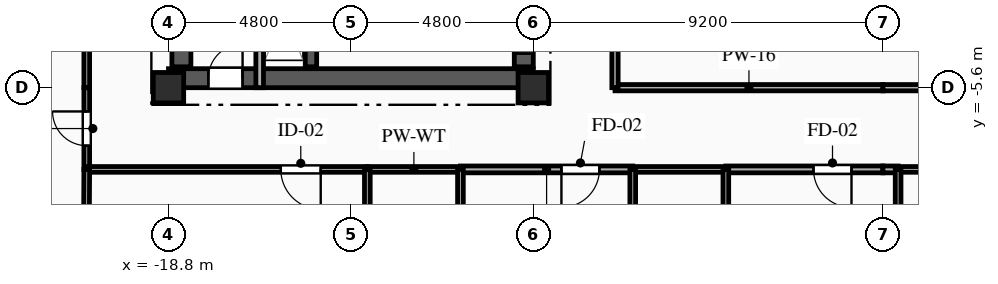
"""IFC4 building model, lengths in metres.
Left out: names, types, materials, properties, quantities, classifications, styles, units other than length and angle.
Written with IfcOpenShell. Run it as: python <this file> out.ifc"""

import sys

from ifc_helpers import new_model, si_unit, direction, frame, frame_2d, origin, origin_2d, place, context, subcontext, project, spatial, rectangle, extrude, element, fill, save


model = new_model("IFC4")
c1 = context("Model", 3, precision=1e-05, world=origin(), true_north=direction((0.0, 1.0)))
c2 = subcontext(c1, "Body", "Model", "MODEL_VIEW")
j1 = project(units=[si_unit("LENGTHUNIT", "METRE"), si_unit("PLANEANGLEUNIT", "RADIAN")], contexts=[c1])
p1 = place(None, origin())
s1 = spatial("IfcSite", under=j1, at=p1, CompositionType="ELEMENT")
p2 = place(p1, origin())
s2 = spatial("IfcBuilding", under=s1, at=p2, CompositionType="ELEMENT")
p3 = place(p2, frame((0.0, 0.0, 213.15)))
s3 = spatial("IfcBuildingStorey", under=s2, at=p3, CompositionType="ELEMENT", Elevation=213.15)
for number, where, z_axis, x_axis in (
    (1, (-18.8, -5.6, 0.0), (0.0, 0.0, 1.0), (1.0, 0.0, 0.0)),
    (2, (-9.2, -5.6, 0.0), (0.0, 0.0, 1.0), (1.0, 0.0, 0.0)),
):
    element("IfcColumn", number, at=place(p3, frame(where, z_axis=z_axis, x_axis=x_axis)), inside=s3, PredefinedType="COLUMN", context=c2, shape_type="SweptSolid", body=[
        extrude(rectangle(XDim=0.8, YDim=0.8, at=origin_2d()), origin(), (0.0, 0.0, 1.0), 3.35),
    ])
p4 = place(p3, frame((-18.8, -5.35, 0.0), z_axis=(0.0, 0.0, 1.0), x_axis=(1.0, 0.0, 0.0)))
e3 = element("IfcWall", 3, at=p4, inside=s3, PredefinedType="SHEAR", context=c2, shape_type="SweptSolid", body=[
    extrude(rectangle(XDim=9.6, YDim=0.5, at=frame_2d((4.8, 0.0))), origin(), (0.0, 0.0, 1.0), 3.04),
])
p5 = place(p4, frame((1.05, 0.0, 0.0)))
e4 = element("IfcOpeningElement", 4, at=p5, cuts=e3, PredefinedType="OPENING", context=c2, shape_type="SweptSolid", body=[
    extrude(rectangle(XDim=0.9, YDim=2.1, at=frame_2d((0.45, 1.05))), frame((0.0, 0.26, 0.0), z_axis=(0.0, -1.0, 0.0), x_axis=(1.0, 0.0, 0.0)), (0.0, 0.0, 1.0), 0.52),
])
p6 = place(p3, frame((-18.46, -5.05, 0.0), z_axis=(0.0, 0.0, 1.0), x_axis=(0.0, 1.0, 0.0)))
e5 = element("IfcWall", 5, at=p6, inside=s3, PredefinedType="SHEAR", context=c2, shape_type="SweptSolid", body=[
    extrude(rectangle(XDim=10.1, YDim=0.5, at=frame_2d((5.05, 0.0))), origin(), (0.0, 0.0, 1.0), 3.04),
])
p7 = place(p3, frame((-9.45, -5.05, 0.0), z_axis=(0.0, 0.0, 1.0), x_axis=(0.0, 1.0, 0.0)))
e6 = element("IfcWall", 6, at=p7, inside=s3, PredefinedType="SHEAR", context=c2, shape_type="SweptSolid", body=[
    extrude(rectangle(XDim=10.1, YDim=0.5, at=frame_2d((5.05, 0.0))), origin(), (0.0, 0.0, 1.0), 3.04),
])
p8 = place(p7, frame((7.15, 0.0, 0.0)))
e7 = element("IfcOpeningElement", 7, at=p8, cuts=e6, PredefinedType="OPENING", context=c2, shape_type="SweptSolid", body=[
    extrude(rectangle(XDim=0.9, YDim=2.1, at=frame_2d((0.45, 1.05))), frame((0.0, 0.26, 0.0), z_axis=(0.0, -1.0, 0.0), x_axis=(1.0, 0.0, 0.0)), (0.0, 0.0, 1.0), 0.52),
])
p9 = place(p7, frame((2.4, 0.0, 0.0)))
e8 = element("IfcOpeningElement", 8, at=p9, cuts=e6, PredefinedType="OPENING", context=c2, shape_type="SweptSolid", body=[
    extrude(rectangle(XDim=1.2, YDim=2.15, at=frame_2d((0.6, 1.075))), frame((0.0, 0.26, 0.0), z_axis=(0.0, -1.0, 0.0), x_axis=(1.0, 0.0, 0.0)), (0.0, 0.0, 1.0), 0.52),
])
p10 = place(p7, frame((0.35, 0.0, 0.0)))
e9 = element("IfcOpeningElement", 9, at=p10, cuts=e6, PredefinedType="OPENING", context=c2, shape_type="SweptSolid", body=[
    extrude(rectangle(XDim=0.9, YDim=2.1, at=frame_2d((0.45, 1.05))), frame((0.0, 0.26, 0.0), z_axis=(0.0, -1.0, 0.0), x_axis=(1.0, 0.0, 0.0)), (0.0, 0.0, 1.0), 0.52),
])
p11 = place(p7, frame((5.0, 0.0, 0.0)))
e10 = element("IfcOpeningElement", 10, at=p11, cuts=e6, PredefinedType="OPENING", context=c2, shape_type="SweptSolid", body=[
    extrude(rectangle(XDim=0.9, YDim=2.1, at=frame_2d((0.45, 1.05))), frame((0.0, 0.26, 0.0), z_axis=(0.0, -1.0, 0.0), x_axis=(1.0, 0.0, 0.0)), (0.0, 0.0, 1.0), 0.52),
])
p12 = place(p3, frame((-15.05, -5.05, 0.0), z_axis=(0.0, 0.0, 1.0), x_axis=(0.0, 1.0, 0.0)))
e11 = element("IfcWall", 11, at=p12, inside=s3, PredefinedType="SHEAR", context=c2, shape_type="SweptSolid", body=[
    extrude(rectangle(XDim=10.1, YDim=0.3, at=frame_2d((5.05, 0.0))), origin(), (0.0, 0.0, 1.0), 3.04),
])
p13 = place(p3, frame((-16.4, -5.6, 0.0), z_axis=(0.0, 0.0, 1.0), x_axis=(0.0, 1.0, 0.0)))
e12 = element("IfcWall", 12, at=p13, inside=s3, PredefinedType="PARTITIONING", context=c2, shape_type="SweptSolid", body=[
    extrude(rectangle(XDim=3.49, YDim=0.2, at=frame_2d((1.745, 0.0))), origin(), (0.0, 0.0, 1.0), 3.04),
])
p14 = place(p3, frame((-20.95, -7.75, 0.0), z_axis=(0.0, 0.0, 1.0), x_axis=(0.0, 1.0, 0.0)))
e13 = element("IfcWall", 13, at=p14, inside=s3, PredefinedType="PARTITIONING", context=c2, shape_type="SweptSolid", body=[
    extrude(rectangle(XDim=2.15, YDim=0.15, at=frame_2d((1.075, 0.0))), origin(), (0.0, 0.0, 1.0), 3.04),
])
p15 = place(p14, frame((0.625, 0.0, 0.0)))
e14 = element("IfcOpeningElement", 14, at=p15, cuts=e13, PredefinedType="OPENING", context=c2, shape_type="SweptSolid", body=[
    extrude(rectangle(XDim=0.9, YDim=2.1, at=frame_2d((0.45, 1.05))), frame((0.0, 0.085, 0.0), z_axis=(0.0, -1.0, 0.0), x_axis=(1.0, 0.0, 0.0)), (0.0, 0.0, 1.0), 0.17),
])
p16 = place(p3, frame((-13.567, -7.75, 0.0), z_axis=(0.0, 0.0, 1.0), x_axis=(-1.0, 0.0, 0.0)))
e15 = element("IfcWall", 15, at=p16, inside=s3, PredefinedType="PARTITIONING", context=c2, shape_type="SweptSolid", body=[
    extrude(rectangle(XDim=7.383, YDim=0.15, at=frame_2d((3.691, 0.0))), origin(), (0.0, 0.0, 1.0), 3.04),
])
p17 = place(p16, frame((1.227, 0.0, 0.0)))
e16 = element("IfcOpeningElement", 16, at=p17, cuts=e15, PredefinedType="OPENING", context=c2, shape_type="SweptSolid", body=[
    extrude(rectangle(XDim=1.05, YDim=2.15, at=frame_2d((0.525, 1.075))), frame((0.0, 0.085, 0.0), z_axis=(0.0, -1.0, 0.0), x_axis=(1.0, 0.0, 0.0)), (0.0, 0.0, 1.0), 0.17),
])
p18 = place(p3, frame((-6.583, -7.75, 0.0), z_axis=(0.0, 0.0, 1.0), x_axis=(-1.0, 0.0, 0.0)))
e17 = element("IfcWall", 17, at=p18, inside=s3, PredefinedType="PARTITIONING", context=c2, shape_type="SweptSolid", body=[
    extrude(rectangle(XDim=4.534, YDim=0.18, at=frame_2d((2.267, 0.0))), origin(), (0.0, 0.0, 1.0), 3.04),
])
p19 = place(p18, frame((0.877, 0.0, 0.0)))
e18 = element("IfcOpeningElement", 18, at=p19, cuts=e17, PredefinedType="OPENING", context=c2, shape_type="SweptSolid", body=[
    extrude(rectangle(XDim=1.0, YDim=2.15, at=frame_2d((0.5, 1.075))), frame((0.0, 0.1, 0.0), z_axis=(0.0, -1.0, 0.0), x_axis=(1.0, 0.0, 0.0)), (0.0, 0.0, 1.0), 0.2),
])
p20 = place(p3, frame((-11.117, -7.75, 0.0), z_axis=(0.0, 0.0, 1.0), x_axis=(-1.0, 0.0, 0.0)))
e19 = element("IfcWall", 19, at=p20, inside=s3, PredefinedType="PLUMBINGWALL", context=c2, shape_type="SweptSolid", body=[
    extrude(rectangle(XDim=2.45, YDim=0.15, at=frame_2d((1.225, 0.0))), origin(), (0.0, 0.0, 1.0), 3.04),
])
p21 = place(p3, frame((0.0, -7.75, 0.0), z_axis=(0.0, 0.0, 1.0), x_axis=(-1.0, 0.0, 0.0)))
e20 = element("IfcWall", 20, at=p21, inside=s3, PredefinedType="PARTITIONING", context=c2, shape_type="SweptSolid", body=[
    extrude(rectangle(XDim=4.133, YDim=0.18, at=frame_2d((2.066, 0.0))), origin(), (0.0, 0.0, 1.0), 3.04),
])
p22 = place(p21, frame((0.827, 0.0, 0.0)))
e21 = element("IfcOpeningElement", 21, at=p22, cuts=e20, PredefinedType="OPENING", context=c2, shape_type="SweptSolid", body=[
    extrude(rectangle(XDim=1.0, YDim=2.15, at=frame_2d((0.5, 1.075))), frame((0.0, 0.1, 0.0), z_axis=(0.0, -1.0, 0.0), x_axis=(1.0, 0.0, 0.0)), (0.0, 0.0, 1.0), 0.2),
])
p23 = place(p3, frame((-4.133, -7.75, 0.0), z_axis=(0.0, 0.0, 1.0), x_axis=(-1.0, 0.0, 0.0)))
e22 = element("IfcWall", 22, at=p23, inside=s3, PredefinedType="PLUMBINGWALL", context=c2, shape_type="SweptSolid", body=[
    extrude(rectangle(XDim=2.45, YDim=0.15, at=frame_2d((1.225, 0.0))), origin(), (0.0, 0.0, 1.0), 3.04),
])
p24 = place(p3, frame((-7.05, -5.6, 0.0), z_axis=(0.0, 0.0, 1.0), x_axis=(1.0, 0.0, 0.0)))
e23 = element("IfcWall", 23, at=p24, inside=s3, PredefinedType="PARTITIONING", context=c2, shape_type="SweptSolid", body=[
    extrude(rectangle(XDim=7.05, YDim=0.165, at=frame_2d((3.525, 0.0))), origin(), (0.0, 0.0, 1.0), 2.525),
])
p25 = place(p3, frame((0.4, -7.75, 0.0), z_axis=(0.0, 0.0, 1.0), x_axis=(-1.0, 0.0, 0.0)))
e24 = element("IfcWall", 24, at=p25, inside=s3, PredefinedType="PARTITIONING", context=c2, shape_type="SweptSolid", body=[
    extrude(rectangle(XDim=0.4, YDim=0.18, at=frame_2d((0.2, 0.0))), origin(), (0.0, 0.0, 1.0), 3.04),
])
p26 = place(p3, frame((2.85, -7.75, 0.0), z_axis=(0.0, 0.0, 1.0), x_axis=(-1.0, 0.0, 0.0)))
e25 = element("IfcWall", 25, at=p26, inside=s3, PredefinedType="PLUMBINGWALL", context=c2, shape_type="SweptSolid", body=[
    extrude(rectangle(XDim=2.45, YDim=0.15, at=frame_2d((1.225, 0.0))), origin(), (0.0, 0.0, 1.0), 3.04),
])
p27 = place(p3, frame((0.0, -5.6, 0.0), z_axis=(0.0, 0.0, 1.0), x_axis=(1.0, 0.0, 0.0)))
e26 = element("IfcWall", 26, at=p27, inside=s3, PredefinedType="PARTITIONING", context=c2, shape_type="SweptSolid", body=[
    extrude(rectangle(XDim=7.05, YDim=0.165, at=frame_2d((3.525, 0.0))), origin(), (0.0, 0.0, 1.0), 2.525),
])
p28 = place(p3, frame((-20.95, -5.6, 0.0), z_axis=(0.0, 0.0, 1.0), x_axis=(0.0, 1.0, 0.0)))
e27 = element("IfcWall", 27, at=p28, inside=s3, PredefinedType="PARTITIONING", context=c2, shape_type="SweptSolid", body=[
    extrude(rectangle(XDim=2.144, YDim=0.15, at=frame_2d((1.072, 0.0))), origin(), (0.0, 0.0, 1.0), 3.04),
])
p29 = place(p3, frame((-7.05, -2.95, 0.0), z_axis=(0.0, 0.0, 1.0), x_axis=(0.0, -1.0, 0.0)))
e28 = element("IfcWall", 28, at=p29, inside=s3, PredefinedType="PARTITIONING", context=c2, shape_type="SweptSolid", body=[
    extrude(rectangle(XDim=2.65, YDim=0.165, at=frame_2d((1.325, 0.0))), origin(), (0.0, 0.0, 1.0), 3.04),
])
p30 = place(p3, frame((-20.95, -7.75, 0.0), z_axis=(0.0, 0.0, 1.0), x_axis=(-0.005804668564, -0.99998315277, 0.0)))
e29 = element("IfcWall", 29, at=p30, inside=s3, PredefinedType="PARTITIONING", context=c2, shape_type="SweptSolid", body=[
    extrude(rectangle(XDim=7.571, YDim=0.15, at=frame_2d((3.785, 0.0))), origin(), (0.0, 0.0, 1.0), 3.04),
])
for number, where, z_axis, x_axis in (
    (30, (-13.567, -7.75, 0.0), (0.0, 0.0, 1.0), (0.0, -1.0, 0.0)),
    (31, (-11.117, -9.9, 0.0), (0.0, 0.0, 1.0), (0.0, 1.0, 0.0)),
    (32, (-6.583, -7.75, 0.0), (0.0, 0.0, 1.0), (0.0, -1.0, 0.0)),
    (33, (-4.133, -9.9, 0.0), (0.0, 0.0, 1.0), (0.0, 1.0, 0.0)),
    (34, (0.4, -7.75, 0.0), (0.0, 0.0, 1.0), (0.0, -1.0, 0.0)),
):
    element("IfcWall", number, at=place(p3, frame(where, z_axis=z_axis, x_axis=x_axis)), inside=s3, PredefinedType="PLUMBINGWALL", context=c2, shape_type="SweptSolid", body=[
        extrude(rectangle(XDim=2.15, YDim=0.15, at=frame_2d((1.075, 0.0))), origin(), (0.0, 0.0, 1.0), 3.04),
    ])
p31 = place(p5, origin())
e35 = element("IfcDoor", 35, at=p31, inside=s3, OperationType="SINGLE_SWING_RIGHT", PredefinedType="DOOR", context=c2, shape_type="SweptSolid", body=[
    extrude(rectangle(XDim=0.9, YDim=2.1, at=frame_2d((0.45, 1.05))), frame((0.0, 0.025, 0.0), z_axis=(0.0, -1.0, 0.0), x_axis=(1.0, 0.0, 0.0)), (0.0, 0.0, 1.0), 0.05),
])
fill(e4, e35)
p32 = place(p10, origin())
e36 = element("IfcDoor", 36, at=p32, inside=s3, OperationType="SINGLE_SWING_RIGHT", PredefinedType="DOOR", context=c2, shape_type="SweptSolid", body=[
    extrude(rectangle(XDim=0.9, YDim=2.1, at=frame_2d((0.45, 1.05))), frame((0.0, 0.025, 0.0), z_axis=(0.0, -1.0, 0.0), x_axis=(1.0, 0.0, 0.0)), (0.0, 0.0, 1.0), 0.05),
])
fill(e9, e36)
p33 = place(p15, origin())
e37 = element("IfcDoor", 37, at=p33, inside=s3, OperationType="SINGLE_SWING_RIGHT", PredefinedType="DOOR", context=c2, shape_type="SweptSolid", body=[
    extrude(rectangle(XDim=0.9, YDim=2.1, at=frame_2d((0.45, 1.05))), frame((0.0, 0.025, 0.0), z_axis=(0.0, -1.0, 0.0), x_axis=(1.0, 0.0, 0.0)), (0.0, 0.0, 1.0), 0.05),
])
fill(e14, e37)
p34 = place(p17, origin())
e38 = element("IfcDoor", 38, at=p34, inside=s3, OperationType="SINGLE_SWING_LEFT", PredefinedType="DOOR", context=c2, shape_type="SweptSolid", body=[
    extrude(rectangle(XDim=1.05, YDim=2.15, at=frame_2d((0.525, 1.075))), frame((0.0, 0.025, 0.0), z_axis=(0.0, -1.0, 0.0), x_axis=(1.0, 0.0, 0.0)), (0.0, 0.0, 1.0), 0.05),
])
fill(e16, e38)
p35 = place(p19, origin())
e39 = element("IfcDoor", 39, at=p35, inside=s3, OperationType="SINGLE_SWING_RIGHT", PredefinedType="DOOR", context=c2, shape_type="SweptSolid", body=[
    extrude(rectangle(XDim=1.0, YDim=2.15, at=frame_2d((0.5, 1.075))), frame((0.0, 0.025, 0.0), z_axis=(0.0, -1.0, 0.0), x_axis=(1.0, 0.0, 0.0)), (0.0, 0.0, 1.0), 0.05),
])
fill(e18, e39)
p36 = place(p22, origin())
e40 = element("IfcDoor", 40, at=p36, inside=s3, OperationType="SINGLE_SWING_LEFT", PredefinedType="DOOR", context=c2, shape_type="SweptSolid", body=[
    extrude(rectangle(XDim=1.0, YDim=2.15, at=frame_2d((0.5, 1.075))), frame((0.0, 0.025, 0.0), z_axis=(0.0, -1.0, 0.0), x_axis=(1.0, 0.0, 0.0)), (0.0, 0.0, 1.0), 0.05),
])
fill(e21, e40)
save(model, sys.argv[1])
